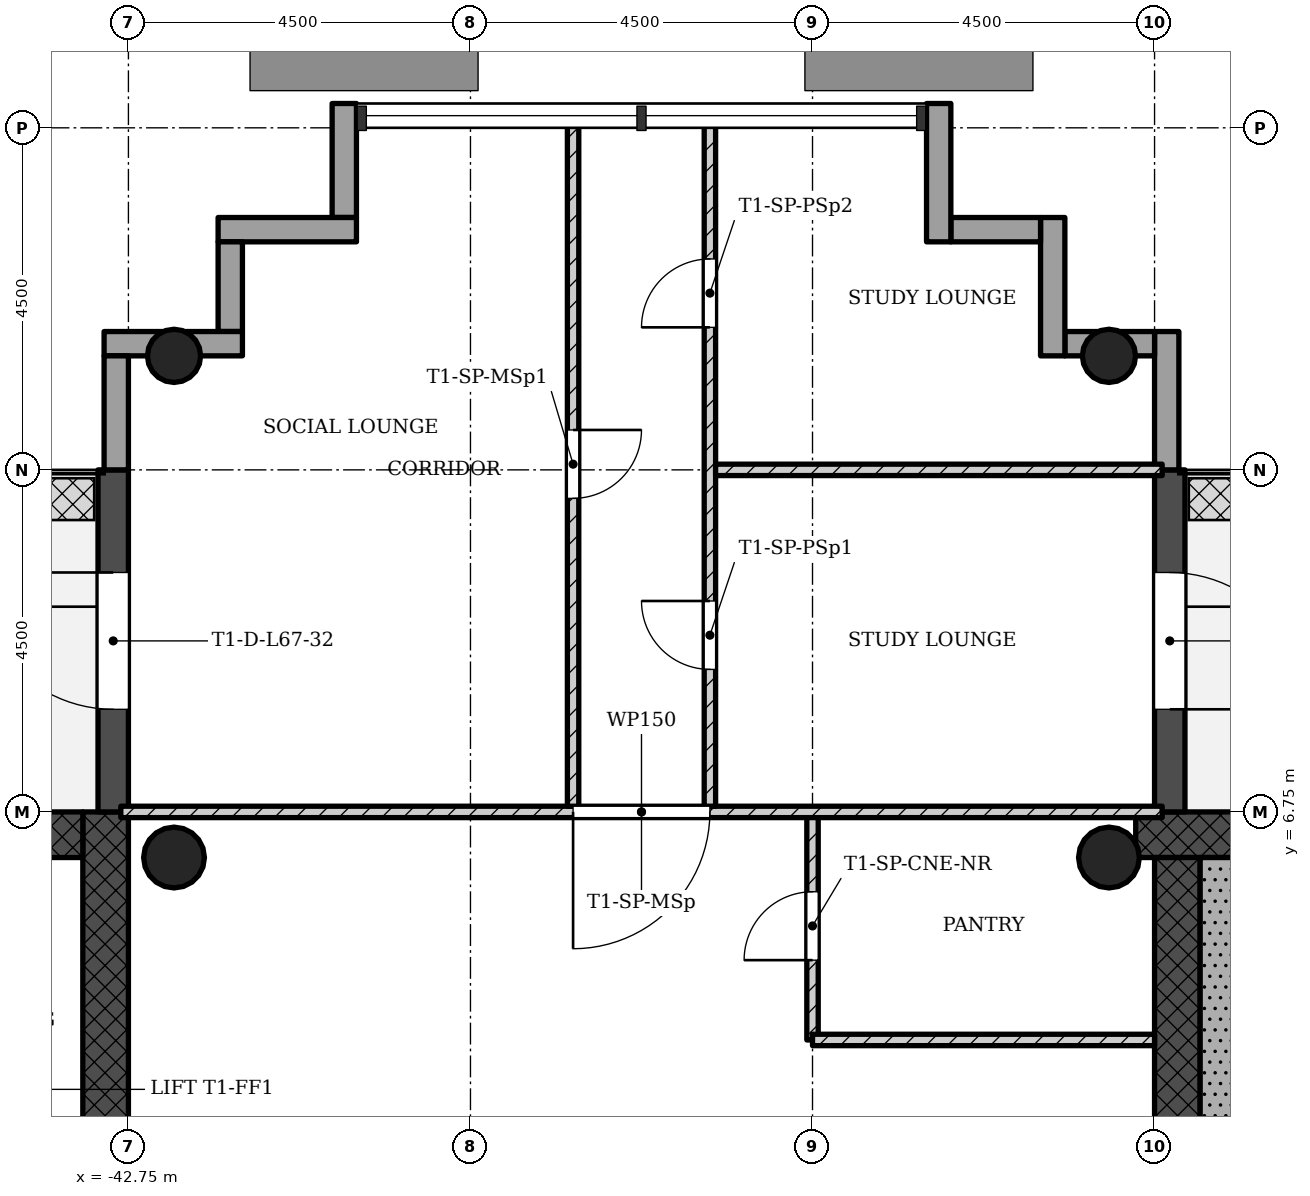
"""IFC4 building model, lengths in metres.
Left out: names, types, materials, properties, quantities, classifications, styles, units other than length and angle.
Written with IfcOpenShell. Run it as: python <this file> out.ifc"""

import sys

from ifc_helpers import new_model, si_unit, direction, frame, frame_2d, origin, origin_2d, place, context, subcontext, project, spatial, rectangle, hollow_circle, extrude, element, fill, save


model = new_model("IFC4")
c1 = context("Model", 3, precision=1e-05, world=origin(), true_north=direction((0.0, 1.0)))
c2 = subcontext(c1, "Body", "Model", "MODEL_VIEW")
j1 = project(units=[si_unit("LENGTHUNIT", "METRE"), si_unit("PLANEANGLEUNIT", "RADIAN")], contexts=[c1])
p1 = place(None, origin())
s1 = spatial("IfcSite", under=j1, at=p1, CompositionType="ELEMENT")
p2 = place(p1, origin())
s2 = spatial("IfcBuilding", under=s1, at=p2, CompositionType="ELEMENT")
p3 = place(p2, frame((0.0, 0.0, 242.4)))
s3 = spatial("IfcBuildingStorey", under=s2, at=p3, CompositionType="ELEMENT", Elevation=242.4)
p4 = place(p3, frame((-20.85, 6.45, 0.0), z_axis=(0.0, 0.0, 1.0), x_axis=(-1.0, 0.0, 0.0)))
e1 = element("IfcWall", 1, at=p4, inside=s3, PredefinedType="SHEAR", context=c2, shape_type="SweptSolid", body=[
    extrude(rectangle(XDim=8.648, YDim=0.6, at=frame_2d((4.324, 0.0))), origin(), (0.0, 0.0, 1.0), 4.5),
])
p5 = place(p3, frame((-28.95, 6.15, 0.0), z_axis=(0.0, 0.0, 1.0), x_axis=(0.0, -1.0, 0.0)))
e2 = element("IfcWall", 2, at=p5, inside=s3, PredefinedType="SHEAR", context=c2, shape_type="SweptSolid", body=[
    extrude(rectangle(XDim=12.9, YDim=0.6, at=frame_2d((6.45, 0.0))), origin(), (0.0, 0.0, 1.0), 4.5),
])
p6 = place(p5, frame((5.25, 0.0, 0.0)))
e3 = element("IfcOpeningElement", 3, at=p6, cuts=e2, PredefinedType="OPENING", context=c2, shape_type="SweptSolid", body=[
    extrude(rectangle(XDim=1.8, YDim=2.1, at=frame_2d((0.9, 1.05))), frame((0.0, 0.31, 0.0), z_axis=(0.0, -1.0, 0.0), x_axis=(1.0, 0.0, 0.0)), (0.0, 0.0, 1.0), 0.62),
])
p7 = place(p3, frame((-43.05, -6.15, 0.0), z_axis=(0.0, 0.0, 1.0), x_axis=(0.0, 1.0, 0.0)))
e4 = element("IfcWall", 4, at=p7, inside=s3, PredefinedType="SHEAR", context=c2, shape_type="SweptSolid", body=[
    extrude(rectangle(XDim=12.9, YDim=0.6, at=frame_2d((6.45, 0.0))), origin(), (0.0, 0.0, 1.0), 4.5),
])
p8 = place(p7, frame((5.25, 0.0, 0.0)))
e5 = element("IfcOpeningElement", 5, at=p8, cuts=e4, PredefinedType="OPENING", context=c2, shape_type="SweptSolid", body=[
    extrude(rectangle(XDim=1.8, YDim=2.1, at=frame_2d((0.9, 1.05))), frame((0.0, 0.31, 0.0), z_axis=(0.0, -1.0, 0.0), x_axis=(1.0, 0.0, 0.0)), (0.0, 0.0, 1.0), 0.62),
])
p9 = place(p3, frame((-43.35, 6.45, 0.0), z_axis=(0.0, 0.0, 1.0), x_axis=(-1.0, 0.0, 0.0)))
e6 = element("IfcWall", 6, at=p9, inside=s3, PredefinedType="SHEAR", context=c2, shape_type="SweptSolid", body=[
    extrude(rectangle(XDim=8.4, YDim=0.6, at=frame_2d((4.2, 0.0))), origin(), (0.0, 0.0, 1.0), 4.5),
])
for number, where, z_axis, x_axis in (
    (7, (-29.85, 12.75, 0.0), (0.0, 0.0, 1.0), (1.0, 0.0, 0.0)),
    (8, (-42.15, 12.75, 0.0), (0.0, 0.0, 1.0), (1.0, 0.0, 0.0)),
):
    element("IfcColumn", number, at=place(p3, frame(where, z_axis=z_axis, x_axis=x_axis)), inside=s3, PredefinedType="COLUMN", context=c2, shape_type="SweptSolid", body=[
        extrude(hollow_circle(Radius=0.35, WallThickness=0.025, at=origin_2d()), origin(), (0.0, 0.0, 1.0), 4.5),
    ])
for number, where, z_axis, x_axis in (
    (9, (-29.85, 6.15, 0.0), (0.0, 0.0, 1.0), (1.0, 0.0, 0.0)),
    (10, (-42.15, 6.15, 0.0), (0.0, 0.0, 1.0), (1.0, 0.0, 0.0)),
):
    element("IfcColumn", number, at=place(p3, frame(where, z_axis=z_axis, x_axis=x_axis)), inside=s3, PredefinedType="COLUMN", context=c2, shape_type="SweptSolid", body=[
        extrude(hollow_circle(Radius=0.4, WallThickness=0.028, at=origin_2d()), origin(), (0.0, 0.0, 1.0), 4.5),
    ])
p10 = place(p3, frame((-29.05, 6.75, -0.02), z_axis=(0.0, 0.0, 1.0), x_axis=(0.0, 1.0, 0.0)))
e11 = element("IfcWall", 11, at=p10, inside=s3, PredefinedType="STANDARD", context=c2, shape_type="SweptSolid", body=[
    extrude(rectangle(XDim=4.5, YDim=0.4, at=frame_2d((2.25, 0.0))), origin(), (0.0, 0.0, 1.0), 4.22),
])
p11 = place(p10, frame((1.35, 0.0, 0.02)))
e12 = element("IfcOpeningElement", 12, at=p11, cuts=e11, PredefinedType="OPENING", context=c2, shape_type="SweptSolid", body=[
    extrude(rectangle(XDim=1.8, YDim=2.1, at=frame_2d((0.9, 1.05))), frame((0.0, 0.21, 0.0), z_axis=(0.0, -1.0, 0.0), x_axis=(1.0, 0.0, 0.0)), (0.0, 0.0, 1.0), 0.42),
])
p12 = place(p3, frame((-29.09, 11.25, -0.3), z_axis=(0.0, 0.0, 1.0), x_axis=(0.0, 1.0, 0.0)))
e13 = element("IfcWall", 13, at=p12, inside=s3, PredefinedType="STANDARD", context=c2, shape_type="SweptSolid", body=[
    extrude(rectangle(XDim=1.82, YDim=0.32, at=frame_2d((0.91, 0.0))), origin(), (0.0, 0.0, 1.0), 4.5),
])
p13 = place(p3, frame((-29.25, 12.91, -0.3), z_axis=(0.0, 0.0, 1.0), x_axis=(-1.0, 0.0, 0.0)))
e14 = element("IfcWall", 14, at=p13, inside=s3, PredefinedType="STANDARD", context=c2, shape_type="SweptSolid", body=[
    extrude(rectangle(XDim=1.18, YDim=0.32, at=frame_2d((0.59, 0.0))), origin(), (0.0, 0.0, 1.0), 4.5),
])
p14 = place(p3, frame((-30.59, 12.75, -0.3), z_axis=(0.0, 0.0, 1.0), x_axis=(0.0, 1.0, 0.0)))
e15 = element("IfcWall", 15, at=p14, inside=s3, PredefinedType="STANDARD", context=c2, shape_type="SweptSolid", body=[
    extrude(rectangle(XDim=1.82, YDim=0.32, at=frame_2d((0.91, 0.0))), origin(), (0.0, 0.0, 1.0), 4.5),
])
p15 = place(p3, frame((-30.75, 14.41, -0.3), z_axis=(0.0, 0.0, 1.0), x_axis=(-1.0, 0.0, 0.0)))
e16 = element("IfcWall", 16, at=p15, inside=s3, PredefinedType="STANDARD", context=c2, shape_type="SweptSolid", body=[
    extrude(rectangle(XDim=1.18, YDim=0.32, at=frame_2d((0.59, 0.0))), origin(), (0.0, 0.0, 1.0), 4.5),
])
p16 = place(p3, frame((-32.09, 14.25, -0.3), z_axis=(0.0, 0.0, 1.0), x_axis=(0.0, 1.0, 0.0)))
e17 = element("IfcWall", 17, at=p16, inside=s3, PredefinedType="STANDARD", context=c2, shape_type="SweptSolid", body=[
    extrude(rectangle(XDim=1.82, YDim=0.32, at=frame_2d((0.91, 0.0))), origin(), (0.0, 0.0, 1.0), 4.5),
])
p17 = place(p3, frame((-39.91, 16.07, -0.3), z_axis=(0.0, 0.0, 1.0), x_axis=(0.0, -1.0, 0.0)))
e18 = element("IfcWall", 18, at=p17, inside=s3, PredefinedType="STANDARD", context=c2, shape_type="SweptSolid", body=[
    extrude(rectangle(XDim=1.5, YDim=0.32, at=frame_2d((0.75, 0.0))), origin(), (0.0, 0.0, 1.0), 4.5),
])
p18 = place(p3, frame((-39.75, 14.41, -0.3), z_axis=(0.0, 0.0, 1.0), x_axis=(-1.0, 0.0, 0.0)))
e19 = element("IfcWall", 19, at=p18, inside=s3, PredefinedType="STANDARD", context=c2, shape_type="SweptSolid", body=[
    extrude(rectangle(XDim=1.82, YDim=0.32, at=frame_2d((0.91, 0.0))), origin(), (0.0, 0.0, 1.0), 4.5),
])
p19 = place(p3, frame((-41.41, 14.25, -0.3), z_axis=(0.0, 0.0, 1.0), x_axis=(0.0, -1.0, 0.0)))
e20 = element("IfcWall", 20, at=p19, inside=s3, PredefinedType="STANDARD", context=c2, shape_type="SweptSolid", body=[
    extrude(rectangle(XDim=1.18, YDim=0.32, at=frame_2d((0.59, 0.0))), origin(), (0.0, 0.0, 1.0), 4.5),
])
p20 = place(p3, frame((-41.25, 12.91, -0.3), z_axis=(0.0, 0.0, 1.0), x_axis=(-1.0, 0.0, 0.0)))
e21 = element("IfcWall", 21, at=p20, inside=s3, PredefinedType="STANDARD", context=c2, shape_type="SweptSolid", body=[
    extrude(rectangle(XDim=1.82, YDim=0.32, at=frame_2d((0.91, 0.0))), origin(), (0.0, 0.0, 1.0), 4.5),
])
p21 = place(p3, frame((-42.91, 12.75, -0.3), z_axis=(0.0, 0.0, 1.0), x_axis=(0.0, -1.0, 0.0)))
e22 = element("IfcWall", 22, at=p21, inside=s3, PredefinedType="STANDARD", context=c2, shape_type="SweptSolid", body=[
    extrude(rectangle(XDim=1.5, YDim=0.32, at=frame_2d((0.75, 0.0))), origin(), (0.0, 0.0, 1.0), 4.5),
])
p22 = place(p3, frame((-42.95, 11.25, -0.02), z_axis=(0.0, 0.0, 1.0), x_axis=(0.0, -1.0, 0.0)))
e23 = element("IfcWall", 23, at=p22, inside=s3, PredefinedType="STANDARD", context=c2, shape_type="SweptSolid", body=[
    extrude(rectangle(XDim=4.5, YDim=0.4, at=frame_2d((2.25, 0.0))), origin(), (0.0, 0.0, 1.0), 4.22),
])
p23 = place(p22, frame((1.35, 0.0, 0.02)))
e24 = element("IfcOpeningElement", 24, at=p23, cuts=e23, PredefinedType="OPENING", context=c2, shape_type="SweptSolid", body=[
    extrude(rectangle(XDim=1.8, YDim=2.1, at=frame_2d((0.9, 1.05))), frame((0.0, 0.21, 0.0), z_axis=(0.0, -1.0, 0.0), x_axis=(1.0, 0.0, 0.0)), (0.0, 0.0, 1.0), 0.42),
])
p24 = place(p3, frame((-33.75, 3.75, 0.0), z_axis=(0.0, 0.0, 1.0), x_axis=(0.0, 1.0, 0.0)))
e25 = element("IfcWall", 25, at=p24, inside=s3, PredefinedType="PARTITIONING", context=c2, shape_type="SweptSolid", body=[
    extrude(rectangle(XDim=3.0, YDim=0.15, at=frame_2d((1.5, 0.0))), origin(), (0.0, 0.0, 1.0), 4.08),
])
p25 = place(p24, frame((1.05, 0.0, 0.0)))
e26 = element("IfcOpeningElement", 26, at=p25, cuts=e25, PredefinedType="OPENING", context=c2, shape_type="SweptSolid", body=[
    extrude(rectangle(XDim=0.9, YDim=2.1, at=frame_2d((0.45, 1.05))), frame((0.0, 0.085, 0.0), z_axis=(0.0, -1.0, 0.0), x_axis=(1.0, 0.0, 0.0)), (0.0, 0.0, 1.0), 0.17),
])
p26 = place(p3, frame((-33.75, 3.75, 0.0), z_axis=(0.0, 0.0, 1.0), x_axis=(1.0, 0.0, 0.0)))
e27 = element("IfcWall", 27, at=p26, inside=s3, PredefinedType="PARTITIONING", context=c2, shape_type="SweptSolid", body=[
    extrude(rectangle(XDim=4.5, YDim=0.15, at=frame_2d((2.25, 0.0))), origin(), (0.0, 0.0, 1.0), 4.08),
])
p27 = place(p3, frame((-42.85, 6.75, 0.0), z_axis=(0.0, 0.0, 1.0), x_axis=(1.0, 0.0, 0.0)))
e28 = element("IfcWall", 28, at=p27, inside=s3, PredefinedType="PARTITIONING", context=c2, shape_type="SweptSolid", body=[
    extrude(rectangle(XDim=13.7, YDim=0.15, at=frame_2d((6.85, 0.0))), origin(), (0.0, 0.0, 1.0), 4.08),
])
p28 = place(p27, frame((5.95, 0.0, 0.0)))
e29 = element("IfcOpeningElement", 29, at=p28, cuts=e28, PredefinedType="OPENING", context=c2, shape_type="SweptSolid", body=[
    extrude(rectangle(XDim=1.8, YDim=2.1, at=frame_2d((0.9, 1.05))), frame((0.0, 0.085, 0.0), z_axis=(0.0, -1.0, 0.0), x_axis=(1.0, 0.0, 0.0)), (0.0, 0.0, 1.0), 0.17),
])
p29 = place(p3, frame((-35.1, 6.825, 0.0), z_axis=(0.0, 0.0, 1.0), x_axis=(0.0, 1.0, 0.0)))
e30 = element("IfcWall", 30, at=p29, inside=s3, PredefinedType="PARTITIONING", context=c2, shape_type="SweptSolid", body=[
    extrude(rectangle(XDim=9.025, YDim=0.15, at=frame_2d((4.513, 0.0))), origin(), (0.0, 0.0, 1.0), 4.08),
])
p30 = place(p29, frame((1.8, 0.0, 0.0)))
e31 = element("IfcOpeningElement", 31, at=p30, cuts=e30, PredefinedType="OPENING", context=c2, shape_type="SweptSolid", body=[
    extrude(rectangle(XDim=0.9, YDim=2.1, at=frame_2d((0.45, 1.05))), frame((0.0, 0.085, 0.0), z_axis=(0.0, -1.0, 0.0), x_axis=(1.0, 0.0, 0.0)), (0.0, 0.0, 1.0), 0.17),
])
p31 = place(p29, frame((6.3, 0.0, 0.0)))
e32 = element("IfcOpeningElement", 32, at=p31, cuts=e30, PredefinedType="OPENING", context=c2, shape_type="SweptSolid", body=[
    extrude(rectangle(XDim=0.9, YDim=2.1, at=frame_2d((0.45, 1.05))), frame((0.0, 0.085, 0.0), z_axis=(0.0, -1.0, 0.0), x_axis=(1.0, 0.0, 0.0)), (0.0, 0.0, 1.0), 0.17),
])
p32 = place(p3, frame((-35.025, 11.25, 0.0), z_axis=(0.0, 0.0, 1.0), x_axis=(1.0, 0.0, 0.0)))
e33 = element("IfcWall", 33, at=p32, inside=s3, PredefinedType="PARTITIONING", context=c2, shape_type="SweptSolid", body=[
    extrude(rectangle(XDim=5.875, YDim=0.15, at=frame_2d((2.938, 0.0))), origin(), (0.0, 0.0, 1.0), 4.08),
])
p33 = place(p3, frame((-36.9, 6.825, 0.0), z_axis=(0.0, 0.0, 1.0), x_axis=(0.0, 1.0, 0.0)))
e34 = element("IfcWall", 34, at=p33, inside=s3, PredefinedType="PARTITIONING", context=c2, shape_type="SweptSolid", body=[
    extrude(rectangle(XDim=9.025, YDim=0.15, at=frame_2d((4.513, 0.0))), origin(), (0.0, 0.0, 1.0), 4.08),
])
p34 = place(p33, frame((4.05, 0.0, 0.0)))
e35 = element("IfcOpeningElement", 35, at=p34, cuts=e34, PredefinedType="OPENING", context=c2, shape_type="SweptSolid", body=[
    extrude(rectangle(XDim=0.9, YDim=2.1, at=frame_2d((0.45, 1.05))), frame((0.0, 0.085, 0.0), z_axis=(0.0, -1.0, 0.0), x_axis=(1.0, 0.0, 0.0)), (0.0, 0.0, 1.0), 0.17),
])
p35 = place(p3, frame((-28.35, 1.85, 0.0), z_axis=(0.0, 0.0, 1.0), x_axis=(0.0, 1.0, 0.0)))
e36 = element("IfcWall", 36, at=p35, inside=s3, PredefinedType="SHEAR", context=c2, shape_type="SweptSolid", body=[
    extrude(rectangle(XDim=4.3, YDim=0.6, at=frame_2d((2.15, 0.0))), origin(), (0.0, 0.0, 1.0), 4.5),
])
p36 = place(p11, origin())
e37 = element("IfcDoor", 37, at=p36, inside=s3, OperationType="SINGLE_SWING_LEFT", PredefinedType="DOOR", context=c2, shape_type="SweptSolid", body=[
    extrude(rectangle(XDim=1.8, YDim=2.1, at=frame_2d((0.9, 1.05))), frame((0.0, 0.025, 0.0), z_axis=(0.0, -1.0, 0.0), x_axis=(1.0, 0.0, 0.0)), (0.0, 0.0, 1.0), 0.05),
])
fill(e12, e37)
p37 = place(p23, origin())
e38 = element("IfcDoor", 38, at=p37, inside=s3, OperationType="SINGLE_SWING_LEFT", PredefinedType="DOOR", context=c2, shape_type="SweptSolid", body=[
    extrude(rectangle(XDim=1.8, YDim=2.1, at=frame_2d((0.9, 1.05))), frame((0.0, 0.025, 0.0), z_axis=(0.0, -1.0, 0.0), x_axis=(1.0, 0.0, 0.0)), (0.0, 0.0, 1.0), 0.05),
])
fill(e24, e38)
p38 = place(p25, origin())
e39 = element("IfcDoor", 39, at=p38, inside=s3, OperationType="SINGLE_SWING_RIGHT", PredefinedType="DOOR", context=c2, shape_type="SweptSolid", body=[
    extrude(rectangle(XDim=0.9, YDim=2.1, at=frame_2d((0.45, 1.05))), frame((0.0, 0.025, 0.0), z_axis=(0.0, -1.0, 0.0), x_axis=(1.0, 0.0, 0.0)), (0.0, 0.0, 1.0), 0.05),
])
fill(e26, e39)
p39 = place(p28, origin())
e40 = element("IfcDoor", 40, at=p39, inside=s3, OperationType="SINGLE_SWING_LEFT", PredefinedType="DOOR", context=c2, shape_type="SweptSolid", body=[
    extrude(rectangle(XDim=1.8, YDim=2.1, at=frame_2d((0.9, 1.05))), frame((0.0, 0.025, 0.0), z_axis=(0.0, -1.0, 0.0), x_axis=(1.0, 0.0, 0.0)), (0.0, 0.0, 1.0), 0.05),
])
fill(e29, e40)
p40 = place(p30, origin())
e41 = element("IfcDoor", 41, at=p40, inside=s3, OperationType="SINGLE_SWING_LEFT", PredefinedType="DOOR", context=c2, shape_type="SweptSolid", body=[
    extrude(rectangle(XDim=0.9, YDim=2.1, at=frame_2d((0.45, 1.05))), frame((0.0, 0.025, 0.0), z_axis=(0.0, -1.0, 0.0), x_axis=(1.0, 0.0, 0.0)), (0.0, 0.0, 1.0), 0.05),
])
fill(e31, e41)
p41 = place(p31, origin())
e42 = element("IfcDoor", 42, at=p41, inside=s3, OperationType="SINGLE_SWING_RIGHT", PredefinedType="DOOR", context=c2, shape_type="SweptSolid", body=[
    extrude(rectangle(XDim=0.9, YDim=2.1, at=frame_2d((0.45, 1.05))), frame((0.0, 0.025, 0.0), z_axis=(0.0, -1.0, 0.0), x_axis=(1.0, 0.0, 0.0)), (0.0, 0.0, 1.0), 0.05),
])
fill(e32, e42)
p42 = place(p34, origin())
e43 = element("IfcDoor", 43, at=p42, inside=s3, OperationType="SINGLE_SWING_RIGHT", PredefinedType="DOOR", context=c2, shape_type="SweptSolid", body=[
    extrude(rectangle(XDim=0.9, YDim=2.1, at=frame_2d((0.45, 1.05))), frame((0.0, 0.025, 0.0), z_axis=(0.0, -1.0, 0.0), x_axis=(1.0, 0.0, 0.0)), (0.0, 0.0, 1.0), 0.05),
])
fill(e35, e43)
save(model, sys.argv[1])
